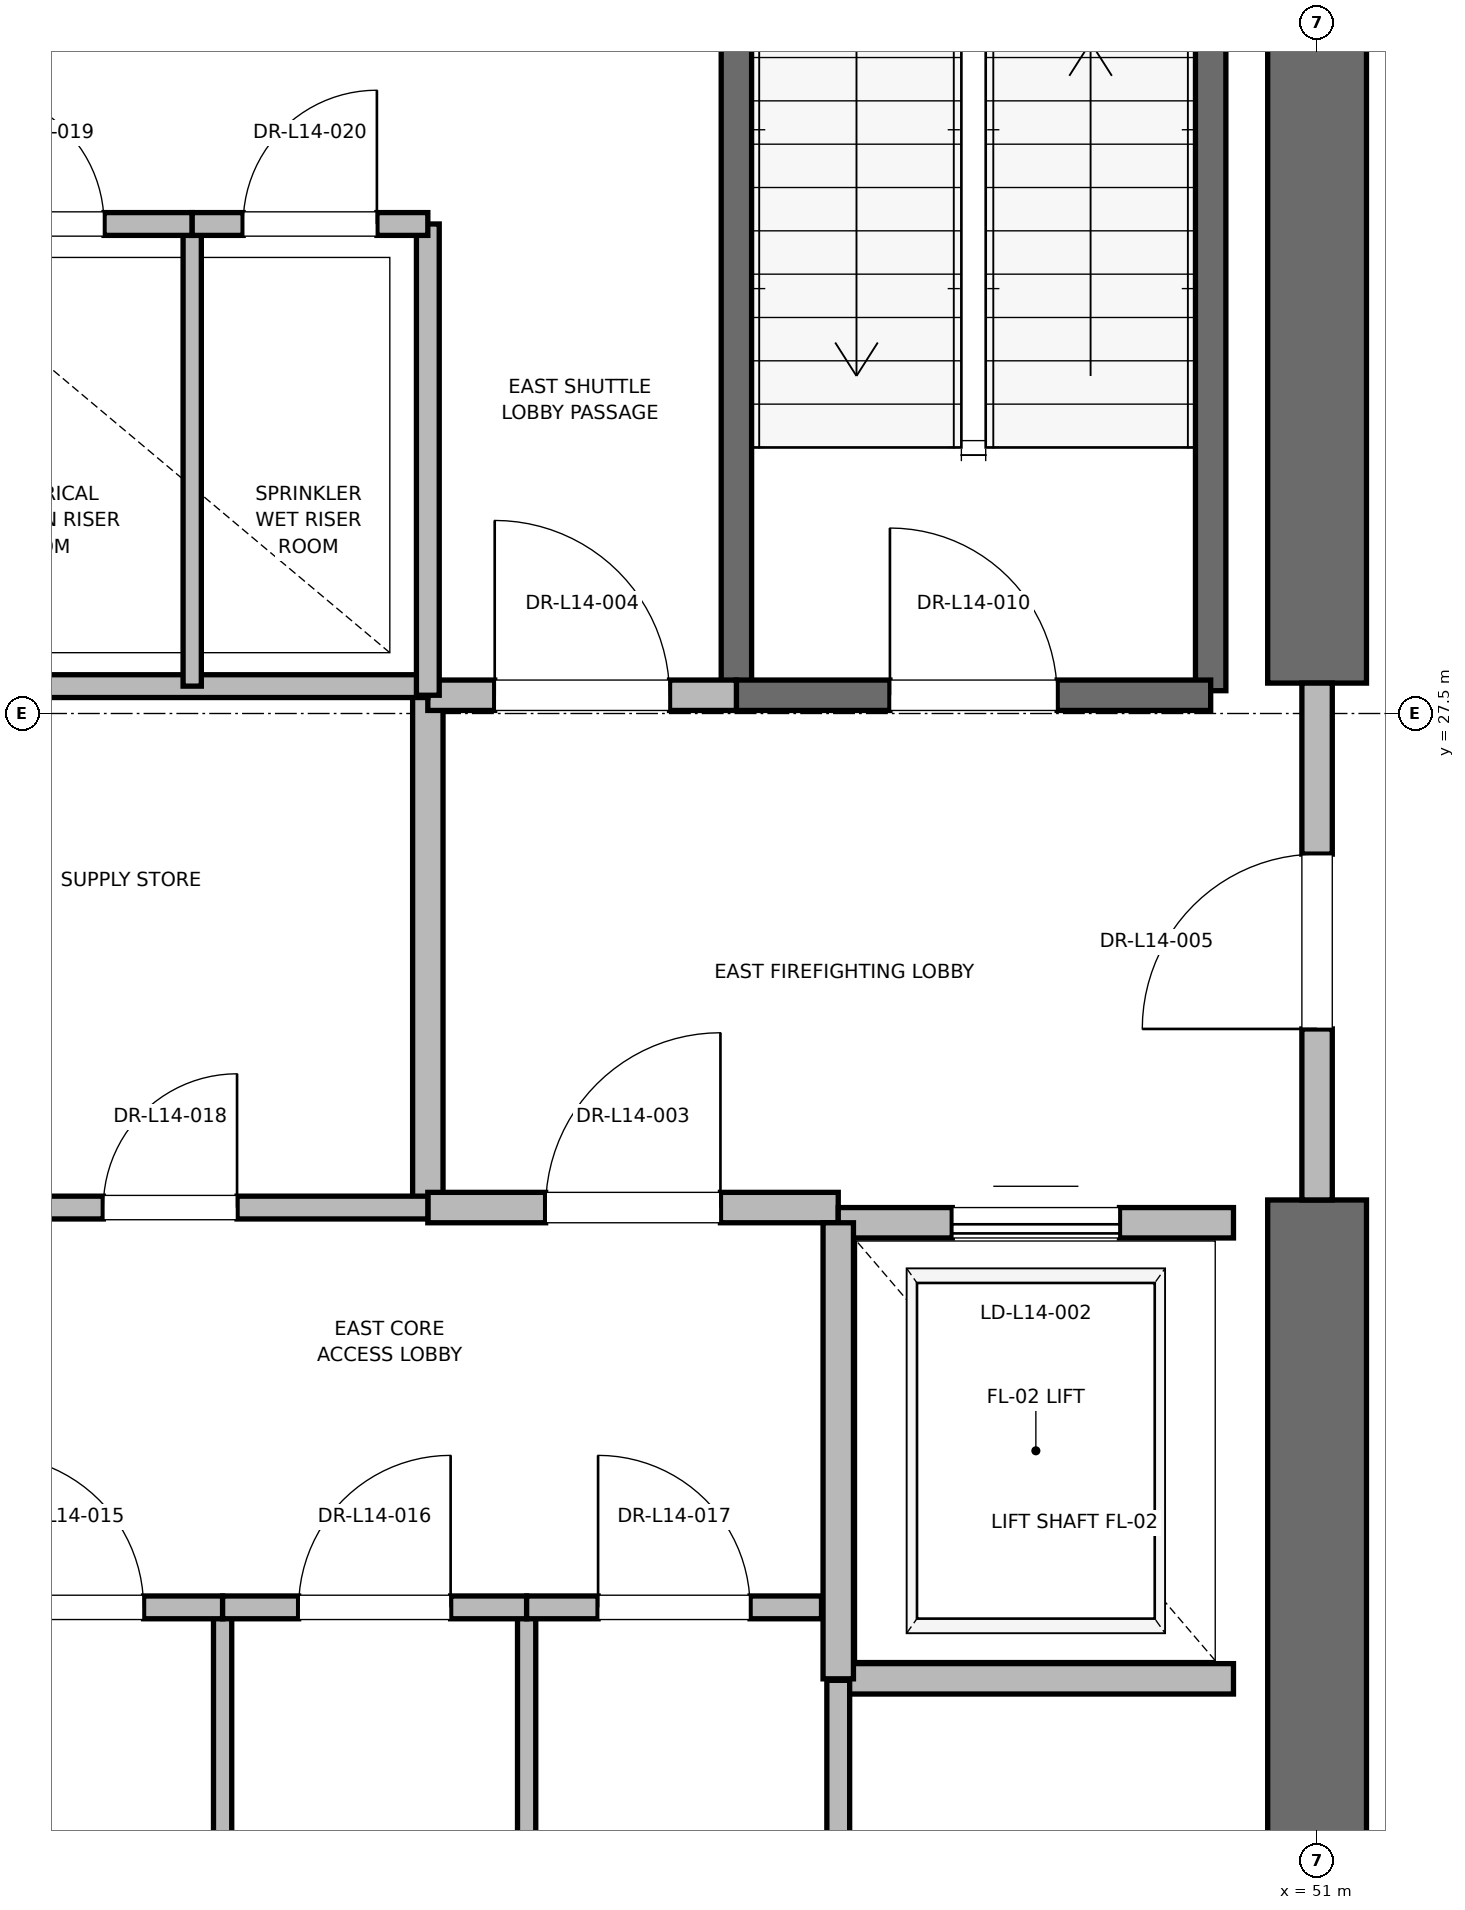
"""IFC4 building model, lengths in metres.
Left out: names, types, materials, properties, quantities, classifications, styles, units other than length and angle.
Written with IfcOpenShell. Run it as: python <this file> out.ifc"""

import sys

from ifc_helpers import new_model, si_unit, direction, frame, frame_2d, origin, place, context, subcontext, project, spatial, rectangle, extrude, element, fill, save


model = new_model("IFC4")
c1 = context("Model", 3, precision=1e-05, world=origin(), true_north=direction((0.0, 1.0)))
c2 = subcontext(c1, "Body", "Model", "MODEL_VIEW")
j1 = project(units=[si_unit("LENGTHUNIT", "METRE"), si_unit("PLANEANGLEUNIT", "RADIAN")], contexts=[c1])
p1 = place(None, origin())
s1 = spatial("IfcSite", under=j1, at=p1, CompositionType="ELEMENT")
p2 = place(p1, origin())
s2 = spatial("IfcBuilding", under=s1, at=p2, CompositionType="ELEMENT")
p3 = place(p2, frame((0.0, 0.0, 63.6)))
s3 = spatial("IfcBuildingStorey", under=s2, at=p3, CompositionType="ELEMENT", Elevation=63.6)
p4 = place(p3, frame((51.0, 18.5, 0.0), z_axis=(0.0, 0.0, 1.0), x_axis=(0.0, 1.0, 0.0)))
e1 = element("IfcWall", 1, at=p4, inside=s3, PredefinedType="SHEAR", context=c2, shape_type="SweptSolid", body=[
    extrude(rectangle(XDim=5.8, YDim=0.65, at=frame_2d((2.9, 0.0))), origin(), (0.0, 0.0, 1.0), 3.76),
])
p5 = place(p3, frame((51.0, 27.7, 0.0), z_axis=(0.0, 0.0, 1.0), x_axis=(0.0, 1.0, 0.0)))
e2 = element("IfcWall", 2, at=p5, inside=s3, PredefinedType="SHEAR", context=c2, shape_type="SweptSolid", body=[
    extrude(rectangle(XDim=8.8, YDim=0.65, at=frame_2d((4.4, 0.0))), origin(), (0.0, 0.0, 1.0), 3.76),
])
p6 = place(p3, frame((50.3, 27.65, 0.0), z_axis=(0.0, 0.0, 1.0), x_axis=(0.0, 1.0, 0.0)))
e3 = element("IfcWall", 3, at=p6, inside=s3, PredefinedType="SOLIDWALL", context=c2, shape_type="SweptSolid", body=[
    extrude(rectangle(XDim=8.15, YDim=0.2, at=frame_2d((4.075, 0.0))), origin(), (0.0, 0.0, 1.0), 3.76),
])
p7 = place(p3, frame((47.18, 27.62, 0.0), z_axis=(0.0, 0.0, 1.0), x_axis=(0.0, 1.0, 0.0)))
e4 = element("IfcWall", 4, at=p7, inside=s3, PredefinedType="SOLIDWALL", context=c2, shape_type="SweptSolid", body=[
    extrude(rectangle(XDim=8.18, YDim=0.2, at=frame_2d((4.09, 0.0))), origin(), (0.0, 0.0, 1.0), 3.76),
])
p8 = place(p3, frame((47.18, 27.62, 0.0), z_axis=(0.0, 0.0, 1.0), x_axis=(1.0, 0.0, 0.0)))
e5 = element("IfcWall", 5, at=p8, inside=s3, PredefinedType="SOLIDWALL", context=c2, shape_type="SweptSolid", body=[
    extrude(rectangle(XDim=3.12, YDim=0.2, at=frame_2d((1.56, 0.0))), origin(), (0.0, 0.0, 1.0), 3.76),
])
p9 = place(p8, frame((1.01, 0.0, 0.0)))
e6 = element("IfcOpeningElement", 6, at=p9, cuts=e5, PredefinedType="OPENING", context=c2, shape_type="SweptSolid", body=[
    extrude(rectangle(XDim=1.1, YDim=2.15, at=frame_2d((0.55, 1.075))), frame((0.0, 0.1, 0.0), z_axis=(0.0, -1.0, 0.0), x_axis=(1.0, 0.0, 0.0)), (0.0, 0.0, 1.0), 0.2),
])
p10 = place(p3, frame((45.15, 24.25, 0.0), z_axis=(0.0, 0.0, 1.0), x_axis=(0.0, 1.0, 0.0)))
e7 = element("IfcWall", 7, at=p10, inside=s3, PredefinedType="PARTITIONING", context=c2, shape_type="SweptSolid", body=[
    extrude(rectangle(XDim=3.37, YDim=0.2, at=frame_2d((1.685, 0.0))), origin(), (0.0, 0.0, 1.0), 3.76),
])
p11 = place(p3, frame((45.15, 24.25, 0.0), z_axis=(0.0, 0.0, 1.0), x_axis=(1.0, 0.0, 0.0)))
e8 = element("IfcWall", 8, at=p11, inside=s3, PredefinedType="PARTITIONING", context=c2, shape_type="SweptSolid", body=[
    extrude(rectangle(XDim=2.7, YDim=0.2, at=frame_2d((1.35, 0.0))), origin(), (0.0, 0.0, 1.0), 3.76),
])
p12 = place(p11, frame((0.775, 0.0, 0.0)))
e9 = element("IfcOpeningElement", 9, at=p12, cuts=e8, PredefinedType="OPENING", context=c2, shape_type="SweptSolid", body=[
    extrude(rectangle(XDim=1.15, YDim=2.2, at=frame_2d((0.575, 1.1))), frame((0.0, 0.1, 0.0), z_axis=(0.0, -1.0, 0.0), x_axis=(1.0, 0.0, 0.0)), (0.0, 0.0, 1.0), 0.2),
])
p13 = place(p3, frame((45.15, 27.62, 0.0), z_axis=(0.0, 0.0, 1.0), x_axis=(1.0, 0.0, 0.0)))
e10 = element("IfcWall", 10, at=p13, inside=s3, PredefinedType="PARTITIONING", context=c2, shape_type="SweptSolid", body=[
    extrude(rectangle(XDim=2.03, YDim=0.2, at=frame_2d((1.015, 0.0))), origin(), (0.0, 0.0, 1.0), 3.76),
])
p14 = place(p13, frame((0.44, 0.0, 0.0)))
e11 = element("IfcOpeningElement", 11, at=p14, cuts=e10, PredefinedType="OPENING", context=c2, shape_type="SweptSolid", body=[
    extrude(rectangle(XDim=1.15, YDim=2.2, at=frame_2d((0.575, 1.1))), frame((0.0, 0.1, 0.0), z_axis=(0.0, -1.0, 0.0), x_axis=(1.0, 0.0, 0.0)), (0.0, 0.0, 1.0), 0.2),
])
p15 = place(p3, frame((51.0, 24.3, 0.0), z_axis=(0.0, 0.0, 1.0), x_axis=(0.0, 1.0, 0.0)))
e12 = element("IfcWall", 12, at=p15, inside=s3, PredefinedType="PARTITIONING", context=c2, shape_type="SweptSolid", body=[
    extrude(rectangle(XDim=3.4, YDim=0.2, at=frame_2d((1.7, 0.0))), origin(), (0.0, 0.0, 1.0), 2.54),
])
p16 = place(p15, frame((1.125, 0.0, 0.0)))
e13 = element("IfcOpeningElement", 13, at=p16, cuts=e12, PredefinedType="OPENING", context=c2, shape_type="SweptSolid", body=[
    extrude(rectangle(XDim=1.15, YDim=2.2, at=frame_2d((0.575, 1.1))), frame((0.0, 0.1, 0.0), z_axis=(0.0, -1.0, 0.0), x_axis=(1.0, 0.0, 0.0)), (0.0, 0.0, 1.0), 0.2),
])
p17 = place(p3, frame((47.85, 21.15, 0.0), z_axis=(0.0, 0.0, 1.0), x_axis=(1.0, 0.0, 0.0)))
e14 = element("IfcWall", 14, at=p17, inside=s3, PredefinedType="SOLIDWALL", context=c2, shape_type="SweptSolid", body=[
    extrude(rectangle(XDim=2.6, YDim=0.2, at=frame_2d((1.3, 0.0))), origin(), (0.0, 0.0, 1.0), 3.76),
])
p18 = place(p3, frame((50.45, 24.15, 0.0), z_axis=(0.0, 0.0, 1.0), x_axis=(-1.0, 0.0, 0.0)))
e15 = element("IfcWall", 15, at=p18, inside=s3, PredefinedType="SOLIDWALL", context=c2, shape_type="SweptSolid", body=[
    extrude(rectangle(XDim=2.6, YDim=0.2, at=frame_2d((1.3, 0.0))), origin(), (0.0, 0.0, 1.0), 2.54),
])
p19 = place(p18, frame((0.75, 0.0, 0.0)))
e16 = element("IfcOpeningElement", 16, at=p19, cuts=e15, PredefinedType="OPENING", context=c2, shape_type="SweptSolid", body=[
    extrude(rectangle(XDim=1.1, YDim=2.2, at=frame_2d((0.55, 1.1))), frame((0.0, 0.1, 0.0), z_axis=(0.0, -1.0, 0.0), x_axis=(1.0, 0.0, 0.0)), (0.0, 0.0, 1.0), 0.2),
])
p20 = place(p3, frame((47.85, 24.15, 0.0), z_axis=(0.0, 0.0, 1.0), x_axis=(0.0, -1.0, 0.0)))
e17 = element("IfcWall", 17, at=p20, inside=s3, PredefinedType="SOLIDWALL", context=c2, shape_type="SweptSolid", body=[
    extrude(rectangle(XDim=3.0, YDim=0.2, at=frame_2d((1.5, 0.0))), origin(), (0.0, 0.0, 1.0), 3.76),
])
p21 = place(p3, frame((41.56, 27.68, 0.0), z_axis=(0.0, 0.0, 1.0), x_axis=(1.0, 0.0, 0.0)))
e18 = element("IfcWall", 18, at=p21, inside=s3, PredefinedType="PARTITIONING", context=c2, shape_type="SweptSolid", body=[
    extrude(rectangle(XDim=3.59, YDim=0.15, at=frame_2d((1.795, 0.0))), origin(), (0.0, 0.0, 1.0), 2.85),
])
p22 = place(p3, frame((47.85, 18.6, 0.0), z_axis=(0.0, 0.0, 1.0), x_axis=(0.0, 1.0, 0.0)))
e19 = element("IfcWall", 19, at=p22, inside=s3, PredefinedType="PARTITIONING", context=c2, shape_type="SweptSolid", body=[
    extrude(rectangle(XDim=2.54, YDim=0.15, at=frame_2d((1.27, 0.0))), origin(), (0.0, 0.0, 1.0), 2.85),
])
for number, where, z_axis, x_axis in (
    (20, (43.8, 18.6, 0.0), (0.0, 0.0, 1.0), (0.0, 1.0, 0.0)),
    (21, (45.8, 18.6, 0.0), (0.0, 0.0, 1.0), (0.0, 1.0, 0.0)),
):
    element("IfcWall", number, at=place(p3, frame(where, z_axis=z_axis, x_axis=x_axis)), inside=s3, PredefinedType="PARTITIONING", context=c2, shape_type="SweptSolid", body=[
        extrude(rectangle(XDim=3.02, YDim=0.12, at=frame_2d((1.51, 0.0))), origin(), (0.0, 0.0, 1.0), 2.85),
    ])
p23 = place(p3, frame((41.76, 21.62, 0.0), z_axis=(0.0, 0.0, 1.0), x_axis=(1.0, 0.0, 0.0)))
e22 = element("IfcWall", 22, at=p23, inside=s3, PredefinedType="PARTITIONING", context=c2, shape_type="SweptSolid", body=[
    extrude(rectangle(XDim=2.04, YDim=0.15, at=frame_2d((1.02, 0.0))), origin(), (0.0, 0.0, 1.0), 2.85),
])
p24 = place(p23, frame((0.52, 0.0, 0.0)))
e23 = element("IfcOpeningElement", 23, at=p24, cuts=e22, PredefinedType="OPENING", context=c2, shape_type="SweptSolid", body=[
    extrude(rectangle(XDim=1.0, YDim=2.15, at=frame_2d((0.5, 1.075))), frame((0.0, 0.075, 0.0), z_axis=(0.0, -1.0, 0.0), x_axis=(1.0, 0.0, 0.0)), (0.0, 0.0, 1.0), 0.15),
])
p25 = place(p3, frame((43.8, 21.62, 0.0), z_axis=(0.0, 0.0, 1.0), x_axis=(1.0, 0.0, 0.0)))
e24 = element("IfcWall", 24, at=p25, inside=s3, PredefinedType="PARTITIONING", context=c2, shape_type="SweptSolid", body=[
    extrude(rectangle(XDim=2.0, YDim=0.15, at=frame_2d((1.0, 0.0))), origin(), (0.0, 0.0, 1.0), 2.85),
])
p26 = place(p25, frame((0.5, 0.0, 0.0)))
e25 = element("IfcOpeningElement", 25, at=p26, cuts=e24, PredefinedType="OPENING", context=c2, shape_type="SweptSolid", body=[
    extrude(rectangle(XDim=1.0, YDim=2.15, at=frame_2d((0.5, 1.075))), frame((0.0, 0.075, 0.0), z_axis=(0.0, -1.0, 0.0), x_axis=(1.0, 0.0, 0.0)), (0.0, 0.0, 1.0), 0.15),
])
p27 = place(p3, frame((45.8, 21.62, 0.0), z_axis=(0.0, 0.0, 1.0), x_axis=(1.0, 0.0, 0.0)))
e26 = element("IfcWall", 26, at=p27, inside=s3, PredefinedType="PARTITIONING", context=c2, shape_type="SweptSolid", body=[
    extrude(rectangle(XDim=1.94, YDim=0.15, at=frame_2d((0.97, 0.0))), origin(), (0.0, 0.0, 1.0), 2.85),
])
p28 = place(p27, frame((0.47, 0.0, 0.0)))
e27 = element("IfcOpeningElement", 27, at=p28, cuts=e26, PredefinedType="OPENING", context=c2, shape_type="SweptSolid", body=[
    extrude(rectangle(XDim=1.0, YDim=2.15, at=frame_2d((0.5, 1.075))), frame((0.0, 0.075, 0.0), z_axis=(0.0, -1.0, 0.0), x_axis=(1.0, 0.0, 0.0)), (0.0, 0.0, 1.0), 0.15),
])
p29 = place(p3, frame((41.76, 24.25, 0.0), z_axis=(0.0, 0.0, 1.0), x_axis=(1.0, 0.0, 0.0)))
e28 = element("IfcWall", 28, at=p29, inside=s3, PredefinedType="PARTITIONING", context=c2, shape_type="SweptSolid", body=[
    extrude(rectangle(XDim=3.39, YDim=0.15, at=frame_2d((1.695, 0.0))), origin(), (0.0, 0.0, 1.0), 2.85),
])
p30 = place(p29, frame((1.255, 0.0, 0.0)))
e29 = element("IfcOpeningElement", 29, at=p30, cuts=e28, PredefinedType="OPENING", context=c2, shape_type="SweptSolid", body=[
    extrude(rectangle(XDim=0.88, YDim=2.1, at=frame_2d((0.44, 1.05))), frame((0.0, 0.075, 0.0), z_axis=(0.0, -1.0, 0.0), x_axis=(1.0, 0.0, 0.0)), (0.0, 0.0, 1.0), 0.15),
])
p31 = place(p3, frame((45.15, 27.62, 0.0), z_axis=(0.0, 0.0, 1.0), x_axis=(0.0, 1.0, 0.0)))
e30 = element("IfcWall", 30, at=p31, inside=s3, PredefinedType="PARTITIONING", context=c2, shape_type="SweptSolid", body=[
    extrude(rectangle(XDim=3.1, YDim=0.15, at=frame_2d((1.55, 0.0))), origin(), (0.0, 0.0, 1.0), 2.85),
])
p32 = place(p3, frame((43.6, 27.68, 0.0), z_axis=(0.0, 0.0, 1.0), x_axis=(0.0, 1.0, 0.0)))
e31 = element("IfcWall", 31, at=p32, inside=s3, PredefinedType="PARTITIONING", context=c2, shape_type="SweptSolid", body=[
    extrude(rectangle(XDim=3.04, YDim=0.12, at=frame_2d((1.52, 0.0))), origin(), (0.0, 0.0, 1.0), 2.85),
])
p33 = place(p3, frame((41.56, 30.72, 0.0), z_axis=(0.0, 0.0, 1.0), x_axis=(1.0, 0.0, 0.0)))
e32 = element("IfcWall", 32, at=p33, inside=s3, PredefinedType="PARTITIONING", context=c2, shape_type="SweptSolid", body=[
    extrude(rectangle(XDim=2.04, YDim=0.15, at=frame_2d((1.02, 0.0))), origin(), (0.0, 0.0, 1.0), 2.85),
])
p34 = place(p33, frame((0.58, 0.0, 0.0)))
e33 = element("IfcOpeningElement", 33, at=p34, cuts=e32, PredefinedType="OPENING", context=c2, shape_type="SweptSolid", body=[
    extrude(rectangle(XDim=0.88, YDim=2.1, at=frame_2d((0.44, 1.05))), frame((0.0, 0.075, 0.0), z_axis=(0.0, -1.0, 0.0), x_axis=(1.0, 0.0, 0.0)), (0.0, 0.0, 1.0), 0.15),
])
p35 = place(p3, frame((43.6, 30.72, 0.0), z_axis=(0.0, 0.0, 1.0), x_axis=(1.0, 0.0, 0.0)))
e34 = element("IfcWall", 34, at=p35, inside=s3, PredefinedType="PARTITIONING", context=c2, shape_type="SweptSolid", body=[
    extrude(rectangle(XDim=1.55, YDim=0.15, at=frame_2d((0.775, 0.0))), origin(), (0.0, 0.0, 1.0), 2.85),
])
p36 = place(p35, frame((0.335, 0.0, 0.0)))
e35 = element("IfcOpeningElement", 35, at=p36, cuts=e34, PredefinedType="OPENING", context=c2, shape_type="SweptSolid", body=[
    extrude(rectangle(XDim=0.88, YDim=2.1, at=frame_2d((0.44, 1.05))), frame((0.0, 0.075, 0.0), z_axis=(0.0, -1.0, 0.0), x_axis=(1.0, 0.0, 0.0)), (0.0, 0.0, 1.0), 0.15),
])
p37 = place(p9, origin())
e36 = element("IfcDoor", 36, at=p37, inside=s3, OperationType="SINGLE_SWING_LEFT", PredefinedType="DOOR", context=c2, shape_type="SweptSolid", body=[
    extrude(rectangle(XDim=1.1, YDim=2.15, at=frame_2d((0.55, 1.075))), frame((0.0, 0.025, 0.0), z_axis=(0.0, -1.0, 0.0), x_axis=(1.0, 0.0, 0.0)), (0.0, 0.0, 1.0), 0.05),
])
fill(e6, e36)
p38 = place(p12, origin())
e37 = element("IfcDoor", 37, at=p38, inside=s3, OperationType="SINGLE_SWING_RIGHT", PredefinedType="DOOR", context=c2, shape_type="SweptSolid", body=[
    extrude(rectangle(XDim=1.15, YDim=2.2, at=frame_2d((0.575, 1.1))), frame((0.0, 0.025, 0.0), z_axis=(0.0, -1.0, 0.0), x_axis=(1.0, 0.0, 0.0)), (0.0, 0.0, 1.0), 0.05),
])
fill(e9, e37)
p39 = place(p14, origin())
e38 = element("IfcDoor", 38, at=p39, inside=s3, OperationType="SINGLE_SWING_LEFT", PredefinedType="DOOR", context=c2, shape_type="SweptSolid", body=[
    extrude(rectangle(XDim=1.15, YDim=2.2, at=frame_2d((0.575, 1.1))), frame((0.0, 0.025, 0.0), z_axis=(0.0, -1.0, 0.0), x_axis=(1.0, 0.0, 0.0)), (0.0, 0.0, 1.0), 0.05),
])
fill(e11, e38)
p40 = place(p16, origin())
e39 = element("IfcDoor", 39, at=p40, inside=s3, OperationType="SINGLE_SWING_LEFT", PredefinedType="DOOR", context=c2, shape_type="SweptSolid", body=[
    extrude(rectangle(XDim=1.15, YDim=2.2, at=frame_2d((0.575, 1.1))), frame((0.0, 0.025, 0.0), z_axis=(0.0, -1.0, 0.0), x_axis=(1.0, 0.0, 0.0)), (0.0, 0.0, 1.0), 0.05),
])
fill(e13, e39)
p41 = place(p19, origin())
e40 = element("IfcDoor", 40, at=p41, inside=s3, OperationType="SLIDING_TO_RIGHT", PredefinedType="DOOR", context=c2, shape_type="SweptSolid", body=[
    extrude(rectangle(XDim=1.1, YDim=2.2, at=frame_2d((0.55, 1.1))), frame((0.0, 0.025, 0.0), z_axis=(0.0, -1.0, 0.0), x_axis=(1.0, 0.0, 0.0)), (0.0, 0.0, 1.0), 0.05),
])
fill(e16, e40)
p42 = place(p24, origin())
e41 = element("IfcDoor", 41, at=p42, inside=s3, OperationType="SINGLE_SWING_LEFT", PredefinedType="DOOR", context=c2, shape_type="SweptSolid", body=[
    extrude(rectangle(XDim=1.0, YDim=2.15, at=frame_2d((0.5, 1.075))), frame((0.0, 0.025, 0.0), z_axis=(0.0, -1.0, 0.0), x_axis=(1.0, 0.0, 0.0)), (0.0, 0.0, 1.0), 0.05),
])
fill(e23, e41)
p43 = place(p26, origin())
e42 = element("IfcDoor", 42, at=p43, inside=s3, OperationType="SINGLE_SWING_RIGHT", PredefinedType="DOOR", context=c2, shape_type="SweptSolid", body=[
    extrude(rectangle(XDim=1.0, YDim=2.15, at=frame_2d((0.5, 1.075))), frame((0.0, 0.025, 0.0), z_axis=(0.0, -1.0, 0.0), x_axis=(1.0, 0.0, 0.0)), (0.0, 0.0, 1.0), 0.05),
])
fill(e25, e42)
p44 = place(p28, origin())
e43 = element("IfcDoor", 43, at=p44, inside=s3, OperationType="SINGLE_SWING_LEFT", PredefinedType="DOOR", context=c2, shape_type="SweptSolid", body=[
    extrude(rectangle(XDim=1.0, YDim=2.15, at=frame_2d((0.5, 1.075))), frame((0.0, 0.025, 0.0), z_axis=(0.0, -1.0, 0.0), x_axis=(1.0, 0.0, 0.0)), (0.0, 0.0, 1.0), 0.05),
])
fill(e27, e43)
p45 = place(p30, origin())
e44 = element("IfcDoor", 44, at=p45, inside=s3, OperationType="SINGLE_SWING_RIGHT", PredefinedType="DOOR", context=c2, shape_type="SweptSolid", body=[
    extrude(rectangle(XDim=0.88, YDim=2.1, at=frame_2d((0.44, 1.05))), frame((0.0, 0.025, 0.0), z_axis=(0.0, -1.0, 0.0), x_axis=(1.0, 0.0, 0.0)), (0.0, 0.0, 1.0), 0.05),
])
fill(e29, e44)
p46 = place(p34, origin())
e45 = element("IfcDoor", 45, at=p46, inside=s3, OperationType="SINGLE_SWING_LEFT", PredefinedType="DOOR", context=c2, shape_type="SweptSolid", body=[
    extrude(rectangle(XDim=0.88, YDim=2.1, at=frame_2d((0.44, 1.05))), frame((0.0, 0.025, 0.0), z_axis=(0.0, -1.0, 0.0), x_axis=(1.0, 0.0, 0.0)), (0.0, 0.0, 1.0), 0.05),
])
fill(e33, e45)
p47 = place(p36, origin())
e46 = element("IfcDoor", 46, at=p47, inside=s3, OperationType="SINGLE_SWING_RIGHT", PredefinedType="DOOR", context=c2, shape_type="SweptSolid", body=[
    extrude(rectangle(XDim=0.88, YDim=2.1, at=frame_2d((0.44, 1.05))), frame((0.0, 0.025, 0.0), z_axis=(0.0, -1.0, 0.0), x_axis=(1.0, 0.0, 0.0)), (0.0, 0.0, 1.0), 0.05),
])
fill(e35, e46)
save(model, sys.argv[1])
